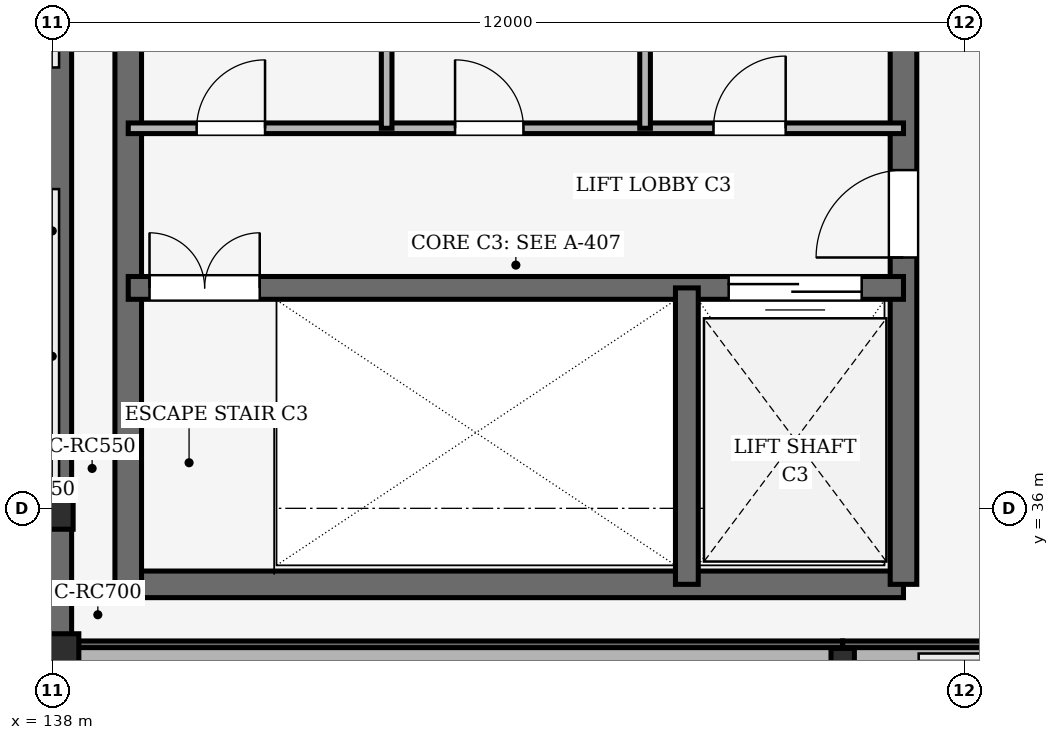
"""IFC4 building model, lengths in metres.
Left out: names, types, materials, properties, quantities, classifications, styles, units other than length and angle.
Written with IfcOpenShell. Run it as: python <this file> out.ifc"""

import sys

from ifc_helpers import new_model, si_unit, direction, frame, frame_2d, origin, origin_2d, place, context, subcontext, project, spatial, rectangle, i_section, extrude, element, fill, save


model = new_model("IFC4")
c1 = context("Model", 3, precision=1e-05, world=origin(), true_north=direction((0.0, 1.0)))
c2 = subcontext(c1, "Body", "Model", "MODEL_VIEW")
j1 = project(units=[si_unit("LENGTHUNIT", "METRE"), si_unit("PLANEANGLEUNIT", "RADIAN")], contexts=[c1])
p1 = place(None, origin())
s1 = spatial("IfcSite", under=j1, at=p1, CompositionType="ELEMENT")
p2 = place(p1, origin())
s2 = spatial("IfcBuilding", under=s1, at=p2, CompositionType="ELEMENT")
p3 = place(p2, frame((0.0, 0.0, 5.4)))
s3 = spatial("IfcBuildingStorey", under=s2, at=p3, CompositionType="ELEMENT", Elevation=5.4)
p4 = place(p3, frame((138.0, 34.0, 0.0), z_axis=(0.0, 0.0, 1.0), x_axis=(1.0, 0.0, 0.0)))
e1 = element("IfcColumn", 1, at=p4, inside=s3, PredefinedType="COLUMN", context=c2, shape_type="SweptSolid", body=[
    extrude(rectangle(XDim=0.7, YDim=0.7, at=origin_2d()), origin(), (0.0, 0.0, 1.0), 6.7),
])
p5 = place(p3, frame((148.4, 34.0, 0.0), z_axis=(0.0, 0.0, 1.0), x_axis=(1.0, 0.0, 0.0)))
e2 = element("IfcColumn", 2, at=p5, inside=s3, PredefinedType="COLUMN", context=c2, shape_type="SweptSolid", body=[
    extrude(i_section(OverallWidth=0.307, OverallDepth=0.314, WebThickness=0.012, FlangeThickness=0.019, FilletRadius=0.015, at=origin_2d()), origin(), (0.0, 0.0, 1.0), 6.5),
])
p6 = place(p3, frame((138.0, 36.0, 0.0), z_axis=(0.0, 0.0, 1.0), x_axis=(1.0, 0.0, 0.0)))
e3 = element("IfcColumn", 3, at=p6, inside=s3, PredefinedType="COLUMN", context=c2, shape_type="SweptSolid", body=[
    extrude(rectangle(XDim=0.55, YDim=0.55, at=origin_2d()), origin(), (0.0, 0.0, 1.0), 5.4),
])
p7 = place(p3, frame((138.0, 48.0, 0.0), z_axis=(0.0, 0.0, 1.0), x_axis=(0.0, -1.0, 0.0)))
e4 = element("IfcWall", 4, at=p7, inside=s3, PredefinedType="SOLIDWALL", context=c2, shape_type="SweptSolid", body=[
    extrude(rectangle(XDim=14.0, YDim=0.51, at=frame_2d((7.0, 0.0))), origin(), (0.0, 0.0, 1.0), 5.45),
])
p8 = place(p3, frame((138.0, 34.0, 0.0), z_axis=(0.0, 0.0, 1.0), x_axis=(1.0, 0.0, 0.0)))
e5 = element("IfcWall", 5, at=p8, inside=s3, PredefinedType="SOLIDWALL", context=c2, shape_type="SweptSolid", body=[
    extrude(rectangle(XDim=10.4, YDim=0.51, at=frame_2d((5.2, 0.0))), origin(), (0.0, 0.0, 1.0), 6.4),
])
p9 = place(p3, frame((148.4, 34.0, 0.0), z_axis=(0.0, 0.0, 1.0), x_axis=(1.0, 0.0, 0.0)))
e6 = element("IfcWall", 6, at=p9, inside=s3, PredefinedType="SOLIDWALL", context=c2, shape_type="SweptSolid", body=[
    extrude(rectangle(XDim=35.2, YDim=0.51, at=frame_2d((17.6, 0.0))), origin(), (0.0, 0.0, 1.0), 1.05),
])
p10 = place(p3, frame((138.0, 34.0, 6.4), z_axis=(0.0, 0.0, 1.0), x_axis=(1.0, 0.0, 0.0)))
e7 = element("IfcWall", 7, at=p10, inside=s3, PredefinedType="SOLIDWALL", context=c2, shape_type="SweptSolid", body=[
    extrude(rectangle(XDim=10.4, YDim=0.335, at=frame_2d((5.2, 0.0))), origin(), (0.0, 0.0, 1.0), 2.118),
])
p11 = place(p3, frame((148.4, 34.0, 6.45), z_axis=(0.0, 0.0, 1.0), x_axis=(1.0, 0.0, 0.0)))
e8 = element("IfcWall", 8, at=p11, inside=s3, PredefinedType="SOLIDWALL", context=c2, shape_type="SweptSolid", body=[
    extrude(rectangle(XDim=35.2, YDim=0.335, at=frame_2d((17.6, 0.0))), origin(), (0.0, 0.0, 1.0), 3.15),
])
p12 = place(p3, frame((139.0, 35.0, 0.0), z_axis=(0.0, 0.0, 1.0), x_axis=(1.0, 0.0, 0.0)))
e9 = element("IfcWall", 9, at=p12, inside=s3, PredefinedType="SHEAR", context=c2, shape_type="SweptSolid", body=[
    extrude(rectangle(XDim=10.2, YDim=0.35, at=frame_2d((5.1, 0.0))), origin(), (0.0, 0.0, 1.0), 5.4),
])
p13 = place(p3, frame((139.0, 43.4, 0.0), z_axis=(0.0, 0.0, 1.0), x_axis=(0.0, -1.0, 0.0)))
e10 = element("IfcWall", 10, at=p13, inside=s3, PredefinedType="SHEAR", context=c2, shape_type="SweptSolid", body=[
    extrude(rectangle(XDim=8.4, YDim=0.35, at=frame_2d((4.2, 0.0))), origin(), (0.0, 0.0, 1.0), 5.4),
])
p14 = place(p3, frame((149.2, 35.0, 0.0), z_axis=(0.0, 0.0, 1.0), x_axis=(0.0, 1.0, 0.0)))
e11 = element("IfcWall", 11, at=p14, inside=s3, PredefinedType="SHEAR", context=c2, shape_type="SweptSolid", body=[
    extrude(rectangle(XDim=8.4, YDim=0.35, at=frame_2d((4.2, 0.0))), origin(), (0.0, 0.0, 1.0), 5.4),
])
p15 = place(p14, frame((4.3, 0.0, 0.0)))
e12 = element("IfcOpeningElement", 12, at=p15, cuts=e11, PredefinedType="OPENING", context=c2, shape_type="SweptSolid", body=[
    extrude(rectangle(XDim=1.15, YDim=2.15, at=frame_2d((0.575, 1.075))), frame((0.0, 0.185, 0.0), z_axis=(0.0, -1.0, 0.0), x_axis=(1.0, 0.0, 0.0)), (0.0, 0.0, 1.0), 0.37),
])
p16 = place(p3, frame((139.0, 38.9, 0.0), z_axis=(0.0, 0.0, 1.0), x_axis=(1.0, 0.0, 0.0)))
e13 = element("IfcWall", 13, at=p16, inside=s3, PredefinedType="SHEAR", context=c2, shape_type="SweptSolid", body=[
    extrude(rectangle(XDim=10.2, YDim=0.3, at=frame_2d((5.1, 0.0))), origin(), (0.0, 0.0, 1.0), 5.4),
])
p17 = place(p16, frame((0.28, 0.0, 0.0)))
e14 = element("IfcOpeningElement", 14, at=p17, cuts=e13, PredefinedType="OPENING", context=c2, shape_type="SweptSolid", body=[
    extrude(rectangle(XDim=1.45, YDim=2.15, at=frame_2d((0.725, 1.075))), frame((0.0, 0.16, 0.0), z_axis=(0.0, -1.0, 0.0), x_axis=(1.0, 0.0, 0.0)), (0.0, 0.0, 1.0), 0.32),
])
p18 = place(p16, frame((7.9, 0.0, 0.0)))
e15 = element("IfcOpeningElement", 15, at=p18, cuts=e13, PredefinedType="OPENING", context=c2, shape_type="SweptSolid", body=[
    extrude(rectangle(XDim=1.75, YDim=2.3, at=frame_2d((0.875, 1.15))), frame((0.0, 0.16, 0.0), z_axis=(0.0, -1.0, 0.0), x_axis=(1.0, 0.0, 0.0)), (0.0, 0.0, 1.0), 0.32),
])
p19 = place(p3, frame((146.35, 35.0, 0.0), z_axis=(0.0, 0.0, 1.0), x_axis=(0.0, 1.0, 0.0)))
e16 = element("IfcWall", 16, at=p19, inside=s3, PredefinedType="SHEAR", context=c2, shape_type="SweptSolid", body=[
    extrude(rectangle(XDim=3.9, YDim=0.3, at=frame_2d((1.95, 0.0))), origin(), (0.0, 0.0, 1.0), 5.4),
])
p20 = place(p3, frame((139.0, 41.0, 0.0), z_axis=(0.0, 0.0, 1.0), x_axis=(1.0, 0.0, 0.0)))
e17 = element("IfcWall", 17, at=p20, inside=s3, PredefinedType="PARTITIONING", context=c2, shape_type="SweptSolid", body=[
    extrude(rectangle(XDim=10.2, YDim=0.14, at=frame_2d((5.1, 0.0))), origin(), (0.0, 0.0, 1.0), 4.5),
])
p21 = place(p20, frame((0.9, 0.0, 0.0)))
e18 = element("IfcOpeningElement", 18, at=p21, cuts=e17, PredefinedType="OPENING", context=c2, shape_type="SweptSolid", body=[
    extrude(rectangle(XDim=0.9, YDim=2.1, at=frame_2d((0.45, 1.05))), frame((0.0, 0.08, 0.0), z_axis=(0.0, -1.0, 0.0), x_axis=(1.0, 0.0, 0.0)), (0.0, 0.0, 1.0), 0.16),
])
p22 = place(p20, frame((4.3, 0.0, 0.0)))
e19 = element("IfcOpeningElement", 19, at=p22, cuts=e17, PredefinedType="OPENING", context=c2, shape_type="SweptSolid", body=[
    extrude(rectangle(XDim=0.9, YDim=2.1, at=frame_2d((0.45, 1.05))), frame((0.0, 0.08, 0.0), z_axis=(0.0, -1.0, 0.0), x_axis=(1.0, 0.0, 0.0)), (0.0, 0.0, 1.0), 0.16),
])
p23 = place(p20, frame((7.7, 0.0, 0.0)))
e20 = element("IfcOpeningElement", 20, at=p23, cuts=e17, PredefinedType="OPENING", context=c2, shape_type="SweptSolid", body=[
    extrude(rectangle(XDim=0.95, YDim=2.1, at=frame_2d((0.475, 1.05))), frame((0.0, 0.08, 0.0), z_axis=(0.0, -1.0, 0.0), x_axis=(1.0, 0.0, 0.0)), (0.0, 0.0, 1.0), 0.16),
])
for number, where, z_axis, x_axis in (
    (21, (142.4, 41.0, 0.0), (0.0, 0.0, 1.0), (0.0, 1.0, 0.0)),
    (22, (145.8, 41.0, 0.0), (0.0, 0.0, 1.0), (0.0, 1.0, 0.0)),
):
    element("IfcWall", number, at=place(p3, frame(where, z_axis=z_axis, x_axis=x_axis)), inside=s3, PredefinedType="PARTITIONING", context=c2, shape_type="SweptSolid", body=[
        extrude(rectangle(XDim=2.4, YDim=0.14, at=frame_2d((1.2, 0.0))), origin(), (0.0, 0.0, 1.0), 4.5),
    ])
p24 = place(p15, origin())
e23 = element("IfcDoor", 23, at=p24, inside=s3, OperationType="SINGLE_SWING_LEFT", PredefinedType="DOOR", context=c2, shape_type="SweptSolid", body=[
    extrude(rectangle(XDim=1.15, YDim=2.15, at=frame_2d((0.575, 1.075))), frame((0.0, 0.025, 0.0), z_axis=(0.0, -1.0, 0.0), x_axis=(1.0, 0.0, 0.0)), (0.0, 0.0, 1.0), 0.05),
])
fill(e12, e23)
p25 = place(p17, origin())
e24 = element("IfcDoor", 24, at=p25, inside=s3, OperationType="DOUBLE_DOOR_SINGLE_SWING", PredefinedType="DOOR", context=c2, shape_type="SweptSolid", body=[
    extrude(rectangle(XDim=1.45, YDim=2.15, at=frame_2d((0.725, 1.075))), frame((0.0, 0.025, 0.0), z_axis=(0.0, -1.0, 0.0), x_axis=(1.0, 0.0, 0.0)), (0.0, 0.0, 1.0), 0.05),
])
fill(e14, e24)
p26 = place(p18, origin())
e25 = element("IfcDoor", 25, at=p26, inside=s3, OperationType="DOUBLE_DOOR_SLIDING", PredefinedType="DOOR", context=c2, shape_type="SweptSolid", body=[
    extrude(rectangle(XDim=1.75, YDim=2.3, at=frame_2d((0.875, 1.15))), frame((0.0, 0.025, 0.0), z_axis=(0.0, -1.0, 0.0), x_axis=(1.0, 0.0, 0.0)), (0.0, 0.0, 1.0), 0.05),
])
fill(e15, e25)
p27 = place(p21, origin())
e26 = element("IfcDoor", 26, at=p27, inside=s3, OperationType="SINGLE_SWING_RIGHT", PredefinedType="DOOR", context=c2, shape_type="SweptSolid", body=[
    extrude(rectangle(XDim=0.9, YDim=2.1, at=frame_2d((0.45, 1.05))), frame((0.0, 0.025, 0.0), z_axis=(0.0, -1.0, 0.0), x_axis=(1.0, 0.0, 0.0)), (0.0, 0.0, 1.0), 0.05),
])
fill(e18, e26)
p28 = place(p22, origin())
e27 = element("IfcDoor", 27, at=p28, inside=s3, OperationType="SINGLE_SWING_LEFT", PredefinedType="DOOR", context=c2, shape_type="SweptSolid", body=[
    extrude(rectangle(XDim=0.9, YDim=2.1, at=frame_2d((0.45, 1.05))), frame((0.0, 0.025, 0.0), z_axis=(0.0, -1.0, 0.0), x_axis=(1.0, 0.0, 0.0)), (0.0, 0.0, 1.0), 0.05),
])
fill(e19, e27)
p29 = place(p23, origin())
e28 = element("IfcDoor", 28, at=p29, inside=s3, OperationType="SINGLE_SWING_RIGHT", PredefinedType="DOOR", context=c2, shape_type="SweptSolid", body=[
    extrude(rectangle(XDim=0.95, YDim=2.1, at=frame_2d((0.475, 1.05))), frame((0.0, 0.025, 0.0), z_axis=(0.0, -1.0, 0.0), x_axis=(1.0, 0.0, 0.0)), (0.0, 0.0, 1.0), 0.05),
])
fill(e20, e28)
save(model, sys.argv[1])
